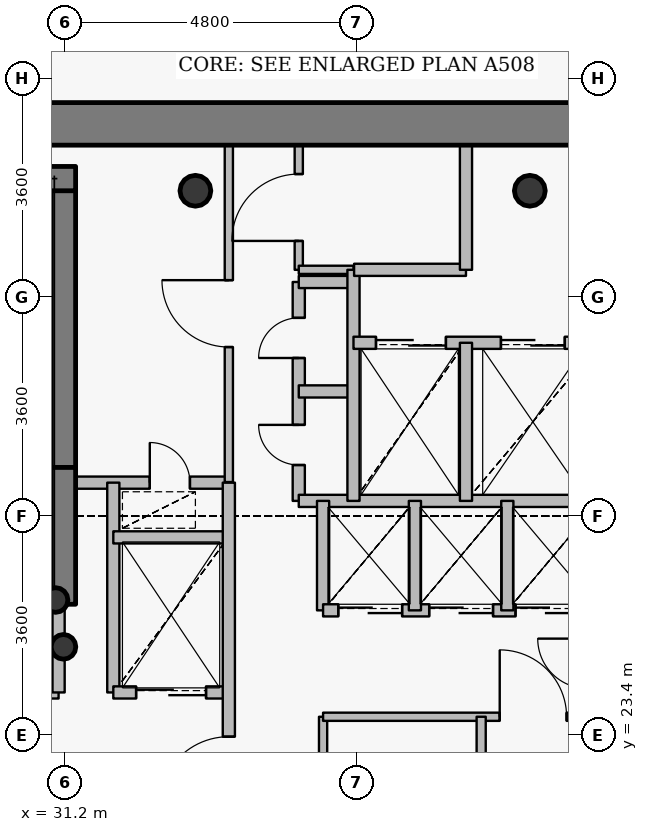
"""IFC4 building model, lengths in metres.
Left out: names, types, materials, properties, quantities, classifications, styles, units other than length and angle.
Written with IfcOpenShell. Run it as: python <this file> out.ifc"""

import sys

from ifc_helpers import new_model, si_unit, direction, frame, frame_2d, origin, origin_2d, place, context, subcontext, project, spatial, rectangle, hollow_circle, extrude, source, transform, mapped, element, fill, save


model = new_model("IFC4")
c1 = context("Model", 3, precision=1e-05, world=origin(), true_north=direction((0.0, 1.0)))
c2 = subcontext(c1, "Body", "Model", "MODEL_VIEW")
j1 = project(units=[si_unit("LENGTHUNIT", "METRE"), si_unit("PLANEANGLEUNIT", "RADIAN")], contexts=[c1])
p1 = place(None, origin())
s1 = spatial("IfcSite", under=j1, at=p1, CompositionType="ELEMENT")
p2 = place(p1, origin())
s2 = spatial("IfcBuilding", under=s1, at=p2, CompositionType="ELEMENT")
p3 = place(p2, frame((0.0, 0.0, 318.0)))
s3 = spatial("IfcBuildingStorey", under=s2, at=p3, CompositionType="ELEMENT", Elevation=318.0)
for number, where, z_axis, x_axis in (
    (1, (38.85, 32.35, 0.0), (0.0, 0.0, 1.0), (1.0, 0.0, 0.0)),
    (2, (33.35, 32.35, 0.0), (0.0, 0.0, 1.0), (1.0, 0.0, 0.0)),
):
    element("IfcColumn", number, at=place(p3, frame(where, z_axis=z_axis, x_axis=x_axis)), inside=s3, PredefinedType="COLUMN", context=c2, shape_type="SweptSolid", body=[
        extrude(hollow_circle(Radius=0.254, WallThickness=0.02, at=origin_2d()), origin(), (0.0, 0.0, 1.0), 6.0),
    ])
p4 = place(p3, frame((31.18, 27.8, 0.0), z_axis=(0.0, 0.0, 1.0), x_axis=(0.0, 1.0, 0.0)))
e3 = element("IfcWall", 3, at=p4, inside=s3, PredefinedType="SHEAR", context=c2, shape_type="SweptSolid", body=[
    extrude(rectangle(XDim=4.75, YDim=0.4, at=frame_2d((2.375, 0.0))), origin(), (0.0, 0.0, 1.0), 6.0),
])
p5 = place(p3, frame((27.25, 32.55, 0.0), z_axis=(0.0, 0.0, 1.0), x_axis=(1.0, 0.0, 0.0)))
e4 = element("IfcWall", 4, at=p5, inside=s3, PredefinedType="SHEAR", context=c2, shape_type="SweptSolid", body=[
    extrude(rectangle(XDim=4.13, YDim=0.4, at=frame_2d((2.065, 0.0))), origin(), (0.0, 0.0, 1.0), 6.0),
])
for number, where, z_axis, x_axis in (
    (5, (31.05, 25.62, 0.0), (0.0, 0.0, 1.0), (1.0, 0.0, 0.0)),
    (6, (31.18, 24.85, 0.0), (0.0, 0.0, 1.0), (1.0, 0.0, 0.0)),
):
    element("IfcColumn", number, at=place(p3, frame(where, z_axis=z_axis, x_axis=x_axis)), inside=s3, PredefinedType="COLUMN", context=c2, shape_type="SweptSolid", body=[
        extrude(hollow_circle(Radius=0.203, WallThickness=0.016, at=origin_2d()), origin(), (0.0, 0.0, 1.0), 6.0),
    ])
p6 = place(p3, frame((27.65, 33.45, 0.0), z_axis=(0.0, 0.0, 1.0), x_axis=(1.0, 0.0, 0.0)))
e7 = element("IfcWall", 7, at=p6, inside=s3, PredefinedType="SHEAR", context=c2, shape_type="SweptSolid", body=[
    extrude(rectangle(XDim=16.7, YDim=0.7, at=frame_2d((8.35, 0.0))), origin(), (0.0, 0.0, 1.0), 5.3),
])
p7 = place(p6, frame((12.15, 0.0, 0.0)))
e8 = element("IfcOpeningElement", 8, at=p7, cuts=e7, PredefinedType="OPENING", context=c2, shape_type="SweptSolid", body=[
    extrude(rectangle(XDim=1.15, YDim=2.15, at=origin_2d()), frame((0.575, 0.36, 1.075), z_axis=(0.0, -1.0, 0.0), x_axis=(1.0, 0.0, 0.0)), (0.0, 0.0, 1.0), 0.72),
])
p8 = place(p3, frame((31.18, 25.55, 0.0), z_axis=(0.0, 0.0, 1.0), x_axis=(0.0, 1.0, 0.0)))
e9 = element("IfcWall", 9, at=p8, inside=s3, PredefinedType="SHEAR", context=c2, shape_type="SweptSolid", body=[
    extrude(rectangle(XDim=2.25, YDim=0.4, at=frame_2d((1.125, 0.0))), origin(), (0.0, 0.0, 1.0), 5.35),
])
p9 = place(p3, frame((27.56, 24.1, 0.0), z_axis=(0.0, 0.0, 1.0), x_axis=(1.0, 0.0, 0.0)))
e10 = element("IfcWall", 10, at=p9, inside=s3, PredefinedType="PARTITIONING", context=c2, shape_type="SweptSolid", body=[
    extrude(rectangle(XDim=3.54, YDim=0.2, at=frame_2d((1.77, 0.0))), origin(), (0.0, 0.0, 1.0), 5.75),
])
p10 = place(p9, frame((1.17, 0.0, 0.0)))
e11 = element("IfcOpeningElement", 11, at=p10, cuts=e10, PredefinedType="OPENING", context=c2, shape_type="SweptSolid", body=[
    extrude(rectangle(XDim=1.2, YDim=2.15, at=origin_2d()), frame((0.6, 0.11, 1.075), z_axis=(0.0, -1.0, 0.0), x_axis=(1.0, 0.0, 0.0)), (0.0, 0.0, 1.0), 0.22),
])
p11 = place(p3, frame((31.1, 24.1, 0.0), z_axis=(0.0, 0.0, 1.0), x_axis=(0.0, 1.0, 0.0)))
e12 = element("IfcWall", 12, at=p11, inside=s3, PredefinedType="PARTITIONING", context=c2, shape_type="SweptSolid", body=[
    extrude(rectangle(XDim=1.44, YDim=0.2, at=frame_2d((0.72, 0.0))), origin(), (0.0, 0.0, 1.0), 5.75),
])
p12 = place(p3, frame((31.1, 27.55, 0.0), z_axis=(0.0, 0.0, 1.0), x_axis=(1.0, 0.0, 0.0)))
e13 = element("IfcWall", 13, at=p12, inside=s3, PredefinedType="PARTITIONING", context=c2, shape_type="SweptSolid", body=[
    extrude(rectangle(XDim=2.8, YDim=0.2, at=frame_2d((1.4, 0.0))), origin(), (0.0, 0.0, 1.0), 5.335),
])
p13 = place(p12, frame((1.5, 0.0, 0.0)))
e14 = element("IfcOpeningElement", 14, at=p13, cuts=e13, PredefinedType="OPENING", context=c2, shape_type="SweptSolid", body=[
    extrude(rectangle(XDim=0.66, YDim=2.05, at=origin_2d()), frame((0.33, 0.11, 1.025), z_axis=(0.0, -1.0, 0.0), x_axis=(1.0, 0.0, 0.0)), (0.0, 0.0, 1.0), 0.22),
])
p14 = place(p3, frame((32.0, 24.1, 0.0), z_axis=(0.0, 0.0, 1.0), x_axis=(0.0, 1.0, 0.0)))
e15 = element("IfcWall", 15, at=p14, inside=s3, PredefinedType="PARTITIONING", context=c2, shape_type="SweptSolid", body=[
    extrude(rectangle(XDim=3.45, YDim=0.2, at=frame_2d((1.725, 0.0))), origin(), (0.0, 0.0, 1.0), 5.75),
])
p15 = place(p3, frame((32.0, 24.1, 0.0), z_axis=(0.0, 0.0, 1.0), x_axis=(1.0, 0.0, 0.0)))
e16 = element("IfcWall", 16, at=p15, inside=s3, PredefinedType="PARTITIONING", context=c2, shape_type="SweptSolid", body=[
    extrude(rectangle(XDim=1.9, YDim=0.2, at=frame_2d((0.95, 0.0))), origin(), (0.0, 0.0, 1.0), 5.335),
])
p16 = place(p15, frame((0.375, 0.0, 0.0)))
e17 = element("IfcOpeningElement", 17, at=p16, cuts=e16, PredefinedType="OPENING", context=c2, shape_type="SweptSolid", body=[
    extrude(rectangle(XDim=1.15, YDim=2.15, at=origin_2d()), frame((0.575, 0.11, 1.075), z_axis=(0.0, -1.0, 0.0), x_axis=(1.0, 0.0, 0.0)), (0.0, 0.0, 1.0), 0.22),
])
p17 = place(p3, frame((32.0, 26.65, 0.0), z_axis=(0.0, 0.0, 1.0), x_axis=(1.0, 0.0, 0.0)))
e18 = element("IfcWall", 18, at=p17, inside=s3, PredefinedType="PARTITIONING", context=c2, shape_type="SweptSolid", body=[
    extrude(rectangle(XDim=1.9, YDim=0.2, at=frame_2d((0.95, 0.0))), origin(), (0.0, 0.0, 1.0), 5.335),
])
p18 = place(p3, frame((33.9, 20.9, 0.0), z_axis=(0.0, 0.0, 1.0), x_axis=(0.0, 1.0, 0.0)))
e19 = element("IfcWall", 19, at=p18, inside=s3, PredefinedType="PARTITIONING", context=c2, shape_type="SweptSolid", body=[
    extrude(rectangle(XDim=6.65, YDim=0.2, at=frame_2d((3.325, 0.0))), origin(), (0.0, 0.0, 1.0), 5.335),
])
p19 = place(p18, frame((1.323, 0.0, 0.0)))
e20 = element("IfcOpeningElement", 20, at=p19, cuts=e19, PredefinedType="OPENING", context=c2, shape_type="SweptSolid", body=[
    extrude(rectangle(XDim=1.15, YDim=2.15, at=origin_2d()), frame((0.575, 0.11, 1.075), z_axis=(0.0, -1.0, 0.0), x_axis=(1.0, 0.0, 0.0)), (0.0, 0.0, 1.0), 0.22),
])
p20 = place(p3, frame((33.9, 27.56, 0.0), z_axis=(0.0, 0.0, 1.0), x_axis=(0.0, 1.0, 0.0)))
e21 = element("IfcWall", 21, at=p20, inside=s3, PredefinedType="PARTITIONING", context=c2, shape_type="SweptSolid", body=[
    extrude(rectangle(XDim=5.54, YDim=0.135, at=frame_2d((2.77, 0.0))), origin(), (0.0, 0.0, 1.0), 5.335),
])
p21 = place(p20, frame((2.22, 0.0, 0.0)))
e22 = element("IfcOpeningElement", 22, at=p21, cuts=e21, PredefinedType="OPENING", context=c2, shape_type="SweptSolid", body=[
    extrude(rectangle(XDim=1.1, YDim=2.15, at=origin_2d()), frame((0.55, 0.078, 1.075), z_axis=(0.0, -1.0, 0.0), x_axis=(1.0, 0.0, 0.0)), (0.0, 0.0, 1.0), 0.155),
])
p22 = place(p3, frame((35.05, 27.25, 0.0), z_axis=(0.0, 0.0, 1.0), x_axis=(0.0, 1.0, 0.0)))
e23 = element("IfcWall", 23, at=p22, inside=s3, PredefinedType="PARTITIONING", context=c2, shape_type="SweptSolid", body=[
    extrude(rectangle(XDim=3.6, YDim=0.2, at=frame_2d((1.8, 0.0))), origin(), (0.0, 0.0, 1.0), 5.75),
])
p23 = place(p22, frame((0.59, 0.0, 0.0)))
e24 = element("IfcOpeningElement", 24, at=p23, cuts=e23, PredefinedType="OPENING", context=c2, shape_type="SweptSolid", body=[
    extrude(rectangle(XDim=0.66, YDim=2.05, at=origin_2d()), frame((0.33, 0.11, 1.025), z_axis=(0.0, -1.0, 0.0), x_axis=(1.0, 0.0, 0.0)), (0.0, 0.0, 1.0), 0.22),
])
p24 = place(p22, frame((2.35, 0.0, 0.0)))
e25 = element("IfcOpeningElement", 25, at=p24, cuts=e23, PredefinedType="OPENING", context=c2, shape_type="SweptSolid", body=[
    extrude(rectangle(XDim=0.66, YDim=2.05, at=origin_2d()), frame((0.33, 0.11, 1.025), z_axis=(0.0, -1.0, 0.0), x_axis=(1.0, 0.0, 0.0)), (0.0, 0.0, 1.0), 0.22),
])
p25 = place(p3, frame((35.05, 27.25, 0.0), z_axis=(0.0, 0.0, 1.0), x_axis=(1.0, 0.0, 0.0)))
e26 = element("IfcWall", 26, at=p25, inside=s3, PredefinedType="PARTITIONING", context=c2, shape_type="SweptSolid", body=[
    extrude(rectangle(XDim=4.95, YDim=0.2, at=frame_2d((2.475, 0.0))), origin(), (0.0, 0.0, 1.0), 5.335),
])
for number, where, z_axis, x_axis in (
    (27, (35.05, 29.05, 0.0), (0.0, 0.0, 1.0), (1.0, 0.0, 0.0)),
    (28, (35.05, 30.85, 0.0), (0.0, 0.0, 1.0), (1.0, 0.0, 0.0)),
):
    element("IfcWall", number, at=place(p3, frame(where, z_axis=z_axis, x_axis=x_axis)), inside=s3, PredefinedType="PARTITIONING", context=c2, shape_type="SweptSolid", body=[
        extrude(rectangle(XDim=0.9, YDim=0.2, at=frame_2d((0.45, 0.0))), origin(), (0.0, 0.0, 1.0), 5.75),
    ])
p26 = place(p3, frame((35.05, 31.05, 0.0), z_axis=(0.0, 0.0, 1.0), x_axis=(0.0, 1.0, 0.0)))
e29 = element("IfcWall", 29, at=p26, inside=s3, PredefinedType="PARTITIONING", context=c2, shape_type="SweptSolid", body=[
    extrude(rectangle(XDim=2.05, YDim=0.135, at=frame_2d((1.025, 0.0))), origin(), (0.0, 0.0, 1.0), 5.335),
])
p27 = place(p26, frame((0.475, 0.0, 0.0)))
e30 = element("IfcOpeningElement", 30, at=p27, cuts=e29, PredefinedType="OPENING", context=c2, shape_type="SweptSolid", body=[
    extrude(rectangle(XDim=1.1, YDim=2.15, at=origin_2d()), frame((0.55, 0.078, 1.075), z_axis=(0.0, -1.0, 0.0), x_axis=(1.0, 0.0, 0.0)), (0.0, 0.0, 1.0), 0.155),
])
p28 = place(p3, frame((35.05, 31.05, 0.0), z_axis=(0.0, 0.0, 1.0), x_axis=(1.0, 0.0, 0.0)))
e31 = element("IfcWall", 31, at=p28, inside=s3, PredefinedType="PARTITIONING", context=c2, shape_type="SweptSolid", body=[
    extrude(rectangle(XDim=0.9, YDim=0.135, at=frame_2d((0.45, 0.0))), origin(), (0.0, 0.0, 1.0), 5.75),
])
p29 = place(p3, frame((35.45, 20.9, 0.0), z_axis=(0.0, 0.0, 1.0), x_axis=(0.0, 1.0, 0.0)))
e32 = element("IfcWall", 32, at=p29, inside=s3, PredefinedType="PARTITIONING", context=c2, shape_type="SweptSolid", body=[
    extrude(rectangle(XDim=2.8, YDim=0.135, at=frame_2d((1.4, 0.0))), origin(), (0.0, 0.0, 1.0), 5.335),
])
p30 = place(p29, frame((0.85, 0.0, 0.0)))
e33 = element("IfcOpeningElement", 33, at=p30, cuts=e32, PredefinedType="OPENING", context=c2, shape_type="SweptSolid", body=[
    extrude(rectangle(XDim=1.1, YDim=2.15, at=origin_2d()), frame((0.55, 0.078, 1.075), z_axis=(0.0, -1.0, 0.0), x_axis=(1.0, 0.0, 0.0)), (0.0, 0.0, 1.0), 0.155),
])
p31 = place(p3, frame((35.45, 23.7, 0.0), z_axis=(0.0, 0.0, 1.0), x_axis=(1.0, 0.0, 0.0)))
e34 = element("IfcWall", 34, at=p31, inside=s3, PredefinedType="PARTITIONING", context=c2, shape_type="SweptSolid", body=[
    extrude(rectangle(XDim=4.35, YDim=0.135, at=frame_2d((2.175, 0.0))), origin(), (0.0, 0.0, 1.0), 5.335),
])
p32 = place(p31, frame((2.905, 0.0, 0.0)))
e35 = element("IfcOpeningElement", 35, at=p32, cuts=e34, PredefinedType="OPENING", context=c2, shape_type="SweptSolid", body=[
    extrude(rectangle(XDim=1.1, YDim=2.15, at=origin_2d()), frame((0.55, 0.078, 1.075), z_axis=(0.0, -1.0, 0.0), x_axis=(1.0, 0.0, 0.0)), (0.0, 0.0, 1.0), 0.155),
])
p33 = place(p3, frame((35.45, 25.45, 0.0), z_axis=(0.0, 0.0, 1.0), x_axis=(0.0, 1.0, 0.0)))
e36 = element("IfcWall", 36, at=p33, inside=s3, PredefinedType="PARTITIONING", context=c2, shape_type="SweptSolid", body=[
    extrude(rectangle(XDim=1.8, YDim=0.2, at=frame_2d((0.9, 0.0))), origin(), (0.0, 0.0, 1.0), 5.75),
])
p34 = place(p3, frame((35.45, 25.45, 0.0), z_axis=(0.0, 0.0, 1.0), x_axis=(1.0, 0.0, 0.0)))
e37 = element("IfcWall", 37, at=p34, inside=s3, PredefinedType="PARTITIONING", context=c2, shape_type="SweptSolid", body=[
    extrude(rectangle(XDim=4.55, YDim=0.2, at=frame_2d((2.275, 0.0))), origin(), (0.0, 0.0, 1.0), 5.335),
])
p35 = place(p34, frame((0.25, 0.0, 0.0)))
e38 = element("IfcOpeningElement", 38, at=p35, cuts=e37, PredefinedType="OPENING", context=c2, shape_type="SweptSolid", body=[
    extrude(rectangle(XDim=1.05, YDim=2.15, at=origin_2d()), frame((0.525, 0.11, 1.075), z_axis=(0.0, -1.0, 0.0), x_axis=(1.0, 0.0, 0.0)), (0.0, 0.0, 1.0), 0.22),
])
p36 = place(p34, frame((1.745, 0.0, 0.0)))
e39 = element("IfcOpeningElement", 39, at=p36, cuts=e37, PredefinedType="OPENING", context=c2, shape_type="SweptSolid", body=[
    extrude(rectangle(XDim=1.05, YDim=2.15, at=origin_2d()), frame((0.525, 0.11, 1.075), z_axis=(0.0, -1.0, 0.0), x_axis=(1.0, 0.0, 0.0)), (0.0, 0.0, 1.0), 0.22),
])
p37 = place(p34, frame((3.165, 0.0, 0.0)))
e40 = element("IfcOpeningElement", 40, at=p37, cuts=e37, PredefinedType="OPENING", context=c2, shape_type="SweptSolid", body=[
    extrude(rectangle(XDim=1.05, YDim=2.15, at=origin_2d()), frame((0.525, 0.11, 1.075), z_axis=(0.0, -1.0, 0.0), x_axis=(1.0, 0.0, 0.0)), (0.0, 0.0, 1.0), 0.22),
])
p38 = place(p3, frame((35.95, 27.25, 0.0), z_axis=(0.0, 0.0, 1.0), x_axis=(0.0, 1.0, 0.0)))
e41 = element("IfcWall", 41, at=p38, inside=s3, PredefinedType="PARTITIONING", context=c2, shape_type="SweptSolid", body=[
    extrude(rectangle(XDim=3.8, YDim=0.2, at=frame_2d((1.9, 0.0))), origin(), (0.0, 0.0, 1.0), 5.75),
])
p39 = place(p3, frame((35.95, 29.85, 0.0), z_axis=(0.0, 0.0, 1.0), x_axis=(1.0, 0.0, 0.0)))
e42 = element("IfcWall", 42, at=p39, inside=s3, PredefinedType="PARTITIONING", context=c2, shape_type="SweptSolid", body=[
    extrude(rectangle(XDim=8.49, YDim=0.2, at=frame_2d((4.245, 0.0))), origin(), (0.0, 0.0, 1.0), 5.335),
])
p40 = place(p39, frame((6.1, 0.0, 0.0)))
e43 = element("IfcOpeningElement", 43, at=p40, cuts=e42, PredefinedType="OPENING", context=c2, shape_type="SweptSolid", body=[
    extrude(rectangle(XDim=1.2, YDim=2.15, at=origin_2d()), frame((0.6, 0.11, 1.075), z_axis=(0.0, -1.0, 0.0), x_axis=(1.0, 0.0, 0.0)), (0.0, 0.0, 1.0), 0.22),
])
p41 = place(p39, frame((0.37, 0.0, 0.0)))
e44 = element("IfcOpeningElement", 44, at=p41, cuts=e42, PredefinedType="OPENING", context=c2, shape_type="SweptSolid", body=[
    extrude(rectangle(XDim=1.15, YDim=2.15, at=origin_2d()), frame((0.575, 0.11, 1.075), z_axis=(0.0, -1.0, 0.0), x_axis=(1.0, 0.0, 0.0)), (0.0, 0.0, 1.0), 0.22),
])
p42 = place(p39, frame((2.425, 0.0, 0.0)))
e45 = element("IfcOpeningElement", 45, at=p42, cuts=e42, PredefinedType="OPENING", context=c2, shape_type="SweptSolid", body=[
    extrude(rectangle(XDim=1.05, YDim=2.15, at=origin_2d()), frame((0.525, 0.11, 1.075), z_axis=(0.0, -1.0, 0.0), x_axis=(1.0, 0.0, 0.0)), (0.0, 0.0, 1.0), 0.22),
])
p43 = place(p3, frame((35.96, 31.05, 0.0), z_axis=(0.0, 0.0, 1.0), x_axis=(1.0, 0.0, 0.0)))
e46 = element("IfcWall", 46, at=p43, inside=s3, PredefinedType="PARTITIONING", context=c2, shape_type="SweptSolid", body=[
    extrude(rectangle(XDim=1.84, YDim=0.2, at=frame_2d((0.92, 0.0))), origin(), (0.0, 0.0, 1.0), 5.75),
])
p44 = place(p3, frame((36.96, 25.45, 0.0), z_axis=(0.0, 0.0, 1.0), x_axis=(0.0, 1.0, 0.0)))
e47 = element("IfcWall", 47, at=p44, inside=s3, PredefinedType="PARTITIONING", context=c2, shape_type="SweptSolid", body=[
    extrude(rectangle(XDim=1.8, YDim=0.2, at=frame_2d((0.9, 0.0))), origin(), (0.0, 0.0, 1.0), 5.75),
])
p45 = place(p3, frame((37.8, 27.25, 0.0), z_axis=(0.0, 0.0, 1.0), x_axis=(0.0, 1.0, 0.0)))
e48 = element("IfcWall", 48, at=p45, inside=s3, PredefinedType="PARTITIONING", context=c2, shape_type="SweptSolid", body=[
    extrude(rectangle(XDim=2.6, YDim=0.2, at=frame_2d((1.3, 0.0))), origin(), (0.0, 0.0, 1.0), 5.75),
])
p46 = place(p3, frame((37.8, 31.05, 0.0), z_axis=(0.0, 0.0, 1.0), x_axis=(0.0, 1.0, 0.0)))
e49 = element("IfcWall", 49, at=p46, inside=s3, PredefinedType="PARTITIONING", context=c2, shape_type="SweptSolid", body=[
    extrude(rectangle(XDim=2.05, YDim=0.2, at=frame_2d((1.025, 0.0))), origin(), (0.0, 0.0, 1.0), 5.335),
])
p47 = place(p3, frame((38.05, 20.38, 0.0), z_axis=(0.0, 0.0, 1.0), x_axis=(0.0, 1.0, 0.0)))
e50 = element("IfcWall", 50, at=p47, inside=s3, PredefinedType="PARTITIONING", context=c2, shape_type="SweptSolid", body=[
    extrude(rectangle(XDim=3.32, YDim=0.15, at=frame_2d((1.66, 0.0))), origin(), (0.0, 0.0, 1.0), 5.285),
])
p48 = place(p3, frame((38.48, 25.45, 0.0), z_axis=(0.0, 0.0, 1.0), x_axis=(0.0, 1.0, 0.0)))
e51 = element("IfcWall", 51, at=p48, inside=s3, PredefinedType="PARTITIONING", context=c2, shape_type="SweptSolid", body=[
    extrude(rectangle(XDim=1.8, YDim=0.2, at=frame_2d((0.9, 0.0))), origin(), (0.0, 0.0, 1.0), 5.75),
])
m1 = source(origin(), c2, "Body", "SweptSolid", [
    extrude(rectangle(XDim=1.15, YDim=2.15, at=origin_2d()), frame((0.575, 0.025, 1.075), z_axis=(0.0, -1.0, 0.0), x_axis=(1.0, 0.0, 0.0)), (0.0, 0.0, 1.0), 0.05),
])
p49 = place(p19, origin())
e52 = element("IfcDoor", 52, at=p49, inside=s3, OperationType="SINGLE_SWING_LEFT", PredefinedType="DOOR", context=c2, shape_type="MappedRepresentation", body=[
    mapped(m1, transform((0.0, 0.0, 0.0), x_axis=(1.0, 0.0, 0.0), y_axis=(0.0, 1.0, 0.0), z_axis=(0.0, 0.0, 1.0), scale=1.0)),
])
fill(e20, e52)
m2 = source(origin(), c2, "Body", "SweptSolid", [
    extrude(rectangle(XDim=1.15, YDim=2.15, at=origin_2d()), frame((0.575, 0.025, 1.075), z_axis=(0.0, -1.0, 0.0), x_axis=(1.0, 0.0, 0.0)), (0.0, 0.0, 1.0), 0.05),
])
p50 = place(p41, origin())
e53 = element("IfcDoor", 53, at=p50, inside=s3, OperationType="DOUBLE_DOOR_SLIDING", PredefinedType="USERDEFINED", context=c2, shape_type="MappedRepresentation", body=[
    mapped(m2, transform((0.0, 0.0, 0.0), x_axis=(1.0, 0.0, 0.0), y_axis=(0.0, 1.0, 0.0), z_axis=(0.0, 0.0, 1.0), scale=1.0)),
])
fill(e44, e53)
p51 = place(p16, origin())
e54 = element("IfcDoor", 54, at=p51, inside=s3, OperationType="DOUBLE_DOOR_SLIDING", PredefinedType="USERDEFINED", context=c2, shape_type="MappedRepresentation", body=[
    mapped(m2, transform((0.0, 0.0, 0.0), x_axis=(1.0, 0.0, 0.0), y_axis=(0.0, 1.0, 0.0), z_axis=(0.0, 0.0, 1.0), scale=1.0)),
])
fill(e17, e54)
m3 = source(origin(), c2, "Body", "SweptSolid", [
    extrude(rectangle(XDim=1.05, YDim=2.15, at=origin_2d()), frame((0.525, 0.025, 1.075), z_axis=(0.0, -1.0, 0.0), x_axis=(1.0, 0.0, 0.0)), (0.0, 0.0, 1.0), 0.05),
])
p52 = place(p42, origin())
e55 = element("IfcDoor", 55, at=p52, inside=s3, OperationType="DOUBLE_DOOR_SLIDING", PredefinedType="USERDEFINED", context=c2, shape_type="MappedRepresentation", body=[
    mapped(m3, transform((0.0, 0.0, 0.0), x_axis=(1.0, 0.0, 0.0), y_axis=(0.0, 1.0, 0.0), z_axis=(0.0, 0.0, 1.0), scale=1.0)),
])
fill(e45, e55)
p53 = place(p35, origin())
e56 = element("IfcDoor", 56, at=p53, inside=s3, OperationType="DOUBLE_DOOR_SLIDING", PredefinedType="USERDEFINED", context=c2, shape_type="MappedRepresentation", body=[
    mapped(m3, transform((0.0, 0.0, 0.0), x_axis=(1.0, 0.0, 0.0), y_axis=(0.0, 1.0, 0.0), z_axis=(0.0, 0.0, 1.0), scale=1.0)),
])
fill(e38, e56)
p54 = place(p36, origin())
e57 = element("IfcDoor", 57, at=p54, inside=s3, OperationType="DOUBLE_DOOR_SLIDING", PredefinedType="USERDEFINED", context=c2, shape_type="MappedRepresentation", body=[
    mapped(m3, transform((0.0, 0.0, 0.0), x_axis=(1.0, 0.0, 0.0), y_axis=(0.0, 1.0, 0.0), z_axis=(0.0, 0.0, 1.0), scale=1.0)),
])
fill(e39, e57)
p55 = place(p37, origin())
e58 = element("IfcDoor", 58, at=p55, inside=s3, OperationType="DOUBLE_DOOR_SLIDING", PredefinedType="USERDEFINED", context=c2, shape_type="MappedRepresentation", body=[
    mapped(m3, transform((0.0, 0.0, 0.0), x_axis=(1.0, 0.0, 0.0), y_axis=(0.0, 1.0, 0.0), z_axis=(0.0, 0.0, 1.0), scale=1.0)),
])
fill(e40, e58)
m4 = source(origin(), c2, "Body", "SweptSolid", [
    extrude(rectangle(XDim=0.66, YDim=2.05, at=origin_2d()), frame((0.33, 0.025, 1.025), z_axis=(0.0, -1.0, 0.0), x_axis=(1.0, 0.0, 0.0)), (0.0, 0.0, 1.0), 0.05),
])
p56 = place(p23, origin())
e59 = element("IfcDoor", 59, at=p56, inside=s3, OperationType="SINGLE_SWING_RIGHT", PredefinedType="USERDEFINED", context=c2, shape_type="MappedRepresentation", body=[
    mapped(m4, transform((0.0, 0.0, 0.0), x_axis=(1.0, 0.0, 0.0), y_axis=(0.0, 1.0, 0.0), z_axis=(0.0, 0.0, 1.0), scale=1.0)),
])
fill(e24, e59)
p57 = place(p24, origin())
e60 = element("IfcDoor", 60, at=p57, inside=s3, OperationType="SINGLE_SWING_LEFT", PredefinedType="USERDEFINED", context=c2, shape_type="MappedRepresentation", body=[
    mapped(m4, transform((0.0, 0.0, 0.0), x_axis=(1.0, 0.0, 0.0), y_axis=(0.0, 1.0, 0.0), z_axis=(0.0, 0.0, 1.0), scale=1.0)),
])
fill(e25, e60)
m5 = source(origin(), c2, "Body", "SweptSolid", [
    extrude(rectangle(XDim=1.1, YDim=2.15, at=origin_2d()), frame((0.55, 0.025, 1.075), z_axis=(0.0, -1.0, 0.0), x_axis=(1.0, 0.0, 0.0)), (0.0, 0.0, 1.0), 0.05),
])
p58 = place(p32, origin())
e61 = element("IfcDoor", 61, at=p58, inside=s3, OperationType="SINGLE_SWING_LEFT", PredefinedType="DOOR", context=c2, shape_type="MappedRepresentation", body=[
    mapped(m5, transform((0.0, 0.0, 0.0), x_axis=(1.0, 0.0, 0.0), y_axis=(0.0, 1.0, 0.0), z_axis=(0.0, 0.0, 1.0), scale=1.0)),
])
fill(e35, e61)
p59 = place(p21, origin())
e62 = element("IfcDoor", 62, at=p59, inside=s3, OperationType="SINGLE_SWING_RIGHT", PredefinedType="DOOR", context=c2, shape_type="MappedRepresentation", body=[
    mapped(m5, transform((0.0, 0.0, 0.0), x_axis=(1.0, 0.0, 0.0), y_axis=(0.0, 1.0, 0.0), z_axis=(0.0, 0.0, 1.0), scale=1.0)),
])
fill(e22, e62)
p60 = place(p27, origin())
e63 = element("IfcDoor", 63, at=p60, inside=s3, OperationType="SINGLE_SWING_LEFT", PredefinedType="DOOR", context=c2, shape_type="MappedRepresentation", body=[
    mapped(m5, transform((0.0, 0.0, 0.0), x_axis=(1.0, 0.0, 0.0), y_axis=(0.0, 1.0, 0.0), z_axis=(0.0, 0.0, 1.0), scale=1.0)),
])
fill(e30, e63)
p61 = place(p13, origin())
e64 = element("IfcDoor", 64, at=p61, inside=s3, OperationType="SINGLE_SWING_LEFT", PredefinedType="USERDEFINED", context=c2, shape_type="MappedRepresentation", body=[
    mapped(m4, transform((0.0, 0.0, 0.0), x_axis=(1.0, 0.0, 0.0), y_axis=(0.0, 1.0, 0.0), z_axis=(0.0, 0.0, 1.0), scale=1.0)),
])
fill(e14, e64)
save(model, sys.argv[1])
